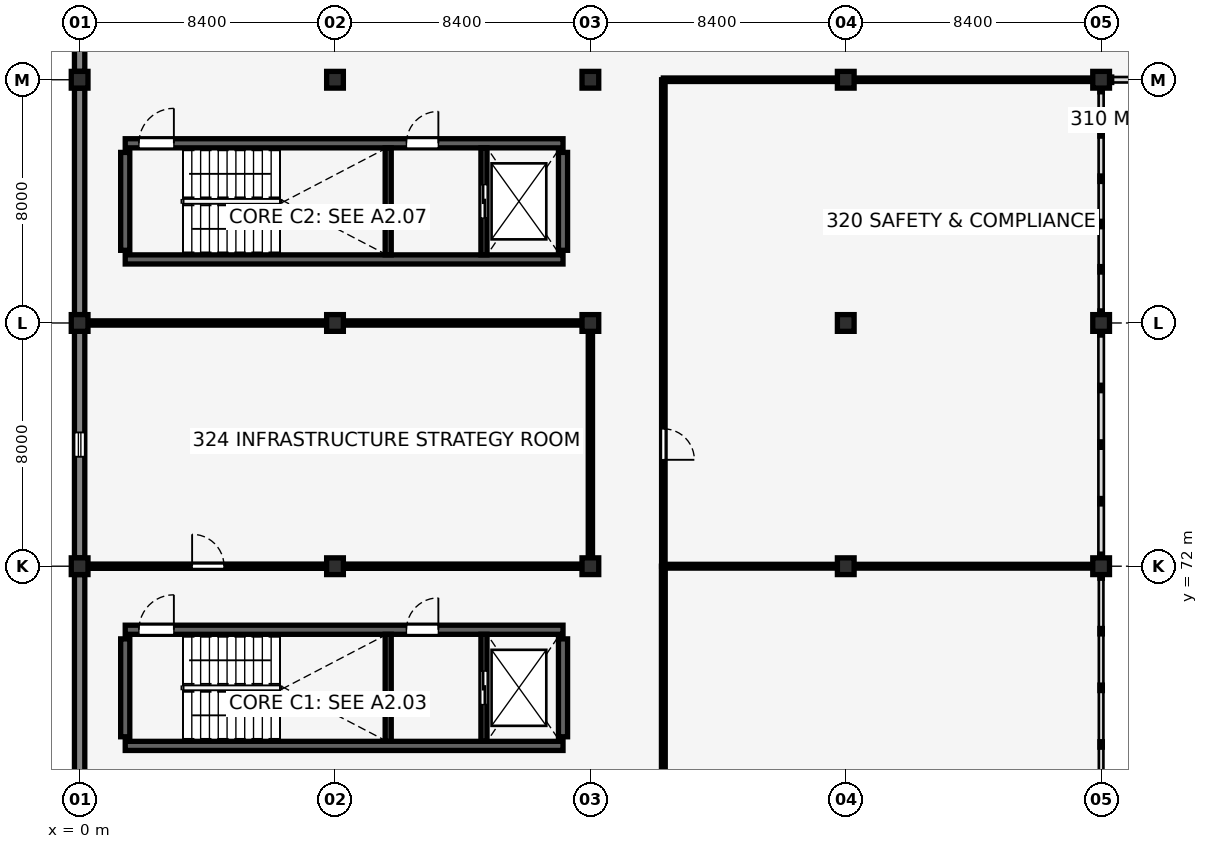
"""IFC4 building model, lengths in metres.
Left out: names, types, materials, properties, quantities, classifications, styles, units other than length and angle.
Written with IfcOpenShell. Run it as: python <this file> out.ifc"""

import sys

from ifc_helpers import new_model, si_unit, direction, frame, frame_2d, origin, origin_2d, place, context, subcontext, project, spatial, rectangle, extrude, element, fill, save


model = new_model("IFC4")
c1 = context("Model", 3, precision=1e-05, world=origin(), true_north=direction((0.0, 1.0)))
c2 = subcontext(c1, "Body", "Model", "MODEL_VIEW")
j1 = project(units=[si_unit("LENGTHUNIT", "METRE"), si_unit("PLANEANGLEUNIT", "RADIAN")], contexts=[c1])
p1 = place(None, origin())
s1 = spatial("IfcSite", under=j1, at=p1, CompositionType="ELEMENT")
p2 = place(p1, origin())
s2 = spatial("IfcBuilding", under=s1, at=p2, CompositionType="ELEMENT")
p3 = place(p2, frame((0.0, 0.0, 13.36)))
s3 = spatial("IfcBuildingStorey", under=s2, at=p3, CompositionType="ELEMENT", Elevation=13.36)
p4 = place(p3, frame((1.5, 66.09, 0.0), z_axis=(0.0, 0.0, 1.0), x_axis=(1.0, 0.0, 0.0)))
e1 = element("IfcWall", 1, at=p4, inside=s3, PredefinedType="SHEAR", context=c2, shape_type="SweptSolid", body=[
    extrude(rectangle(XDim=14.4, YDim=0.3, at=frame_2d((7.2, 0.0))), origin(), (0.0, 0.0, 1.0), 3.58),
])
p5 = place(p3, frame((1.5, 69.91, 0.0), z_axis=(0.0, 0.0, 1.0), x_axis=(1.0, 0.0, 0.0)))
e2 = element("IfcWall", 2, at=p5, inside=s3, PredefinedType="SHEAR", context=c2, shape_type="SweptSolid", body=[
    extrude(rectangle(XDim=14.4, YDim=0.3, at=frame_2d((7.2, 0.0))), origin(), (0.0, 0.0, 1.0), 3.58),
])
p6 = place(p5, frame((0.45, 0.0, 0.0), z_axis=(0.0, 0.0, 1.0), x_axis=(1.0, 0.0, 0.0)))
e3 = element("IfcOpeningElement", 3, at=p6, cuts=e2, PredefinedType="OPENING", context=c2, shape_type="SweptSolid", body=[
    extrude(rectangle(XDim=1.15, YDim=2.15, at=frame_2d((0.575, 1.075))), frame((0.0, 0.16, 0.0), z_axis=(0.0, -1.0, 0.0), x_axis=(1.0, 0.0, 0.0)), (0.0, 0.0, 1.0), 0.32),
])
p7 = place(p5, frame((9.25, 0.0, 0.0), z_axis=(0.0, 0.0, 1.0), x_axis=(1.0, 0.0, 0.0)))
e4 = element("IfcOpeningElement", 4, at=p7, cuts=e2, PredefinedType="OPENING", context=c2, shape_type="SweptSolid", body=[
    extrude(rectangle(XDim=1.05, YDim=2.15, at=frame_2d((0.525, 1.075))), frame((0.0, 0.16, 0.0), z_axis=(0.0, -1.0, 0.0), x_axis=(1.0, 0.0, 0.0)), (0.0, 0.0, 1.0), 0.32),
])
for number, where, z_axis, x_axis in (
    (5, (1.5, 66.39, 0.0), (0.0, 0.0, 1.0), (0.0, 1.0, 0.0)),
    (6, (15.9, 66.39, 0.0), (0.0, 0.0, 1.0), (0.0, 1.0, 0.0)),
):
    element("IfcWall", number, at=place(p3, frame(where, z_axis=z_axis, x_axis=x_axis)), inside=s3, PredefinedType="SHEAR", context=c2, shape_type="SweptSolid", body=[
        extrude(rectangle(XDim=3.22, YDim=0.3, at=frame_2d((1.61, 0.0))), origin(), (0.0, 0.0, 1.0), 3.58),
    ])
p8 = place(p3, frame((1.5, 82.09, 0.0), z_axis=(0.0, 0.0, 1.0), x_axis=(1.0, 0.0, 0.0)))
e7 = element("IfcWall", 7, at=p8, inside=s3, PredefinedType="SHEAR", context=c2, shape_type="SweptSolid", body=[
    extrude(rectangle(XDim=14.4, YDim=0.3, at=frame_2d((7.2, 0.0))), origin(), (0.0, 0.0, 1.0), 3.58),
])
p9 = place(p3, frame((1.5, 85.91, 0.0), z_axis=(0.0, 0.0, 1.0), x_axis=(1.0, 0.0, 0.0)))
e8 = element("IfcWall", 8, at=p9, inside=s3, PredefinedType="SHEAR", context=c2, shape_type="SweptSolid", body=[
    extrude(rectangle(XDim=14.4, YDim=0.3, at=frame_2d((7.2, 0.0))), origin(), (0.0, 0.0, 1.0), 3.58),
])
p10 = place(p9, frame((0.45, 0.0, 0.0), z_axis=(0.0, 0.0, 1.0), x_axis=(1.0, 0.0, 0.0)))
e9 = element("IfcOpeningElement", 9, at=p10, cuts=e8, PredefinedType="OPENING", context=c2, shape_type="SweptSolid", body=[
    extrude(rectangle(XDim=1.15, YDim=2.15, at=frame_2d((0.575, 1.075))), frame((0.0, 0.16, 0.0), z_axis=(0.0, -1.0, 0.0), x_axis=(1.0, 0.0, 0.0)), (0.0, 0.0, 1.0), 0.32),
])
p11 = place(p9, frame((9.25, 0.0, 0.0), z_axis=(0.0, 0.0, 1.0), x_axis=(1.0, 0.0, 0.0)))
e10 = element("IfcOpeningElement", 10, at=p11, cuts=e8, PredefinedType="OPENING", context=c2, shape_type="SweptSolid", body=[
    extrude(rectangle(XDim=1.05, YDim=2.15, at=frame_2d((0.525, 1.075))), frame((0.0, 0.16, 0.0), z_axis=(0.0, -1.0, 0.0), x_axis=(1.0, 0.0, 0.0)), (0.0, 0.0, 1.0), 0.32),
])
for number, where, z_axis, x_axis in (
    (11, (1.5, 82.39, 0.0), (0.0, 0.0, 1.0), (0.0, 1.0, 0.0)),
    (12, (15.9, 82.39, 0.0), (0.0, 0.0, 1.0), (0.0, 1.0, 0.0)),
):
    element("IfcWall", number, at=place(p3, frame(where, z_axis=z_axis, x_axis=x_axis)), inside=s3, PredefinedType="SHEAR", context=c2, shape_type="SweptSolid", body=[
        extrude(rectangle(XDim=3.22, YDim=0.3, at=frame_2d((1.61, 0.0))), origin(), (0.0, 0.0, 1.0), 3.58),
    ])
for number, where, z_axis, x_axis in (
    (13, (0.0, 72.0, 0.0), (0.0, 0.0, 1.0), (1.0, 0.0, 0.0)),
    (14, (0.0, 80.0, 0.0), (0.0, 0.0, 1.0), (1.0, 0.0, 0.0)),
    (15, (0.0, 88.0, 0.0), (0.0, 0.0, 1.0), (1.0, 0.0, 0.0)),
    (16, (8.4, 72.0, 0.0), (0.0, 0.0, 1.0), (1.0, 0.0, 0.0)),
    (17, (8.4, 80.0, 0.0), (0.0, 0.0, 1.0), (1.0, 0.0, 0.0)),
    (18, (8.4, 88.0, 0.0), (0.0, 0.0, 1.0), (1.0, 0.0, 0.0)),
    (19, (16.8, 72.0, 0.0), (0.0, 0.0, 1.0), (1.0, 0.0, 0.0)),
    (20, (16.8, 80.0, 0.0), (0.0, 0.0, 1.0), (1.0, 0.0, 0.0)),
    (21, (16.8, 88.0, 0.0), (0.0, 0.0, 1.0), (1.0, 0.0, 0.0)),
    (22, (25.2, 72.0, 0.0), (0.0, 0.0, 1.0), (1.0, 0.0, 0.0)),
    (23, (25.2, 80.0, 0.0), (0.0, 0.0, 1.0), (1.0, 0.0, 0.0)),
    (24, (25.2, 88.0, 0.0), (0.0, 0.0, 1.0), (1.0, 0.0, 0.0)),
    (25, (33.6, 72.0, 0.0), (0.0, 0.0, 1.0), (1.0, 0.0, 0.0)),
    (26, (33.6, 80.0, 0.0), (0.0, 0.0, 1.0), (1.0, 0.0, 0.0)),
    (27, (33.6, 88.0, 0.0), (0.0, 0.0, 1.0), (1.0, 0.0, 0.0)),
):
    element("IfcColumn", number, at=place(p3, frame(where, z_axis=z_axis, x_axis=x_axis)), inside=s3, PredefinedType="COLUMN", context=c2, shape_type="SweptSolid", body=[
        extrude(rectangle(XDim=0.55, YDim=0.55, at=origin_2d()), origin(), (0.0, 0.0, 1.0), 3.58),
    ])
p12 = place(p3, frame((0.0, 64.275, 0.0), z_axis=(0.0, 0.0, 1.0), x_axis=(0.0, 1.0, 0.0)))
e28 = element("IfcWall", 28, at=p12, inside=s3, PredefinedType="SOLIDWALL", context=c2, shape_type="SweptSolid", body=[
    extrude(rectangle(XDim=7.45, YDim=0.34, at=frame_2d((3.725, 0.0))), origin(), (0.0, 0.0, 1.0), 3.28),
])
p13 = place(p3, frame((0.0, 72.275, 0.0), z_axis=(0.0, 0.0, 1.0), x_axis=(0.0, 1.0, 0.0)))
e29 = element("IfcWall", 29, at=p13, inside=s3, PredefinedType="SOLIDWALL", context=c2, shape_type="SweptSolid", body=[
    extrude(rectangle(XDim=7.45, YDim=0.34, at=frame_2d((3.725, 0.0))), origin(), (0.0, 0.0, 1.0), 3.28),
])
p14 = place(p13, frame((3.325, 0.0, 0.65), z_axis=(0.0, 0.0, 1.0), x_axis=(1.0, 0.0, 0.0)))
e30 = element("IfcOpeningElement", 30, at=p14, cuts=e29, PredefinedType="OPENING", context=c2, shape_type="SweptSolid", body=[
    extrude(rectangle(XDim=0.8, YDim=1.85, at=frame_2d((0.4, 0.925))), frame((0.0, 0.18, 0.0), z_axis=(0.0, -1.0, 0.0), x_axis=(1.0, 0.0, 0.0)), (0.0, 0.0, 1.0), 0.36),
])
p15 = place(p3, frame((0.0, 80.275, 0.0), z_axis=(0.0, 0.0, 1.0), x_axis=(0.0, 1.0, 0.0)))
e31 = element("IfcWall", 31, at=p15, inside=s3, PredefinedType="SOLIDWALL", context=c2, shape_type="SweptSolid", body=[
    extrude(rectangle(XDim=7.45, YDim=0.34, at=frame_2d((3.725, 0.0))), origin(), (0.0, 0.0, 1.0), 3.28),
])
p16 = place(p3, frame((0.0, 88.275, 0.0), z_axis=(0.0, 0.0, 1.0), x_axis=(0.0, 1.0, 0.0)))
e32 = element("IfcWall", 32, at=p16, inside=s3, PredefinedType="SOLIDWALL", context=c2, shape_type="SweptSolid", body=[
    extrude(rectangle(XDim=7.45, YDim=0.34, at=frame_2d((3.725, 0.0))), origin(), (0.0, 0.0, 1.0), 3.28),
])
p17 = place(p16, frame((3.125, 0.0, 1.55), z_axis=(0.0, 0.0, 1.0), x_axis=(1.0, 0.0, 0.0)))
e33 = element("IfcOpeningElement", 33, at=p17, cuts=e32, PredefinedType="OPENING", context=c2, shape_type="SweptSolid", body=[
    extrude(rectangle(XDim=1.2, YDim=0.95, at=frame_2d((0.6, 0.475))), frame((0.0, 0.18, 0.0), z_axis=(0.0, -1.0, 0.0), x_axis=(1.0, 0.0, 0.0)), (0.0, 0.0, 1.0), 0.36),
])
p18 = place(p3, frame((10.15, 66.24, 0.0), z_axis=(0.0, 0.0, 1.0), x_axis=(0.0, 1.0, 0.0)))
e34 = element("IfcWall", 34, at=p18, inside=s3, PredefinedType="SHEAR", context=c2, shape_type="SweptSolid", body=[
    extrude(rectangle(XDim=3.52, YDim=0.2, at=frame_2d((1.76, 0.0))), origin(), (0.0, 0.0, 1.0), 3.58),
])
p19 = place(p3, frame((13.3, 66.24, 0.0), z_axis=(0.0, 0.0, 1.0), x_axis=(0.0, 1.0, 0.0)))
e35 = element("IfcWall", 35, at=p19, inside=s3, PredefinedType="SHEAR", context=c2, shape_type="SweptSolid", body=[
    extrude(rectangle(XDim=3.52, YDim=0.2, at=frame_2d((1.76, 0.0))), origin(), (0.0, 0.0, 1.0), 3.58),
])
p20 = place(p19, frame((1.21, 0.0, 0.0), z_axis=(0.0, 0.0, 1.0), x_axis=(1.0, 0.0, 0.0)))
e36 = element("IfcOpeningElement", 36, at=p20, cuts=e35, PredefinedType="OPENING", context=c2, shape_type="SweptSolid", body=[
    extrude(rectangle(XDim=1.1, YDim=2.15, at=frame_2d((0.55, 1.075))), frame((0.0, 0.11, 0.0), z_axis=(0.0, -1.0, 0.0), x_axis=(1.0, 0.0, 0.0)), (0.0, 0.0, 1.0), 0.22),
])
p21 = place(p3, frame((10.15, 82.24, 0.0), z_axis=(0.0, 0.0, 1.0), x_axis=(0.0, 1.0, 0.0)))
e37 = element("IfcWall", 37, at=p21, inside=s3, PredefinedType="SHEAR", context=c2, shape_type="SweptSolid", body=[
    extrude(rectangle(XDim=3.52, YDim=0.2, at=frame_2d((1.76, 0.0))), origin(), (0.0, 0.0, 1.0), 3.58),
])
p22 = place(p3, frame((13.3, 82.24, 0.0), z_axis=(0.0, 0.0, 1.0), x_axis=(0.0, 1.0, 0.0)))
e38 = element("IfcWall", 38, at=p22, inside=s3, PredefinedType="SHEAR", context=c2, shape_type="SweptSolid", body=[
    extrude(rectangle(XDim=3.52, YDim=0.2, at=frame_2d((1.76, 0.0))), origin(), (0.0, 0.0, 1.0), 3.58),
])
p23 = place(p22, frame((1.21, 0.0, 0.0), z_axis=(0.0, 0.0, 1.0), x_axis=(1.0, 0.0, 0.0)))
e39 = element("IfcOpeningElement", 39, at=p23, cuts=e38, PredefinedType="OPENING", context=c2, shape_type="SweptSolid", body=[
    extrude(rectangle(XDim=1.1, YDim=2.15, at=frame_2d((0.55, 1.075))), frame((0.0, 0.11, 0.0), z_axis=(0.0, -1.0, 0.0), x_axis=(1.0, 0.0, 0.0)), (0.0, 0.0, 1.0), 0.22),
])
p24 = place(p3, frame((0.265, 72.0, 0.0), z_axis=(0.0, 0.0, 1.0), x_axis=(1.0, 0.0, 0.0)))
e40 = element("IfcWall", 40, at=p24, inside=s3, PredefinedType="PARTITIONING", context=c2, shape_type="SweptSolid", body=[
    extrude(rectangle(XDim=7.87, YDim=0.14, at=frame_2d((3.935, 0.0))), origin(), (0.0, 0.0, 1.0), 3.123),
])
p25 = place(p24, frame((3.435, 0.0, 0.0), z_axis=(0.0, 0.0, 1.0), x_axis=(1.0, 0.0, 0.0)))
e41 = element("IfcOpeningElement", 41, at=p25, cuts=e40, PredefinedType="OPENING", context=c2, shape_type="SweptSolid", body=[
    extrude(rectangle(XDim=1.05, YDim=2.15, at=frame_2d((0.525, 1.075))), frame((0.0, 0.08, 0.0), z_axis=(0.0, -1.0, 0.0), x_axis=(1.0, 0.0, 0.0)), (0.0, 0.0, 1.0), 0.16),
])
p26 = place(p3, frame((19.2, 48.04, 0.0), z_axis=(0.0, 0.0, 1.0), x_axis=(0.0, 1.0, 0.0)))
e42 = element("IfcWall", 42, at=p26, inside=s3, PredefinedType="PARTITIONING", context=c2, shape_type="SweptSolid", body=[
    extrude(rectangle(XDim=23.96, YDim=0.125, at=frame_2d((11.98, 0.0))), origin(), (0.0, 0.0, 1.0), 3.58),
])
p27 = place(p26, frame((4.36, 0.0, 0.0), z_axis=(0.0, 0.0, 1.0), x_axis=(-1.0, 0.0, 0.0)))
e43 = element("IfcOpeningElement", 43, at=p27, cuts=e42, PredefinedType="OPENING", context=c2, shape_type="SweptSolid", body=[
    extrude(rectangle(XDim=0.9, YDim=2.1, at=frame_2d((0.45, 1.05))), frame((0.0, 0.073, 0.0), z_axis=(0.0, -1.0, 0.0), x_axis=(1.0, 0.0, 0.0)), (0.0, 0.0, 1.0), 0.145),
])
p28 = place(p3, frame((19.2, 72.0, 0.0), z_axis=(0.0, 0.0, 1.0), x_axis=(0.0, 1.0, 0.0)))
e44 = element("IfcWall", 44, at=p28, inside=s3, PredefinedType="PARTITIONING", context=c2, shape_type="SweptSolid", body=[
    extrude(rectangle(XDim=16.0, YDim=0.115, at=frame_2d((8.0, 0.0))), origin(), (0.0, 0.0, 1.0), 3.58),
])
p29 = place(p28, frame((4.52, 0.0, 0.0), z_axis=(0.0, 0.0, 1.0), x_axis=(-1.0, 0.0, 0.0)))
e45 = element("IfcOpeningElement", 45, at=p29, cuts=e44, PredefinedType="OPENING", context=c2, shape_type="SweptSolid", body=[
    extrude(rectangle(XDim=1.02, YDim=2.16, at=frame_2d((0.51, 1.08))), frame((0.0, 0.067, 0.0), z_axis=(0.0, -1.0, 0.0), x_axis=(1.0, 0.0, 0.0)), (0.0, 0.0, 1.0), 0.135),
])
p30 = place(p3, frame((8.665, 72.0, 0.0), z_axis=(0.0, 0.0, 1.0), x_axis=(1.0, 0.0, 0.0)))
e46 = element("IfcWall", 46, at=p30, inside=s3, PredefinedType="PARTITIONING", context=c2, shape_type="SweptSolid", body=[
    extrude(rectangle(XDim=7.87, YDim=0.14, at=frame_2d((3.935, 0.0))), origin(), (0.0, 0.0, 1.0), 3.123),
])
p31 = place(p3, frame((0.265, 80.0, 0.0), z_axis=(0.0, 0.0, 1.0), x_axis=(1.0, 0.0, 0.0)))
e47 = element("IfcWall", 47, at=p31, inside=s3, PredefinedType="PARTITIONING", context=c2, shape_type="SweptSolid", body=[
    extrude(rectangle(XDim=7.87, YDim=0.14, at=frame_2d((3.935, 0.0))), origin(), (0.0, 0.0, 1.0), 3.123),
])
p32 = place(p3, frame((8.665, 80.0, 0.0), z_axis=(0.0, 0.0, 1.0), x_axis=(1.0, 0.0, 0.0)))
e48 = element("IfcWall", 48, at=p32, inside=s3, PredefinedType="PARTITIONING", context=c2, shape_type="SweptSolid", body=[
    extrude(rectangle(XDim=7.87, YDim=0.14, at=frame_2d((3.935, 0.0))), origin(), (0.0, 0.0, 1.0), 3.123),
])
p33 = place(p3, frame((16.8, 72.265, 0.0), z_axis=(0.0, 0.0, 1.0), x_axis=(0.0, 1.0, 0.0)))
e49 = element("IfcWall", 49, at=p33, inside=s3, PredefinedType="PARTITIONING", context=c2, shape_type="SweptSolid", body=[
    extrude(rectangle(XDim=7.47, YDim=0.14, at=frame_2d((3.735, 0.0))), origin(), (0.0, 0.0, 1.0), 3.126),
])
p34 = place(p3, frame((19.2, 72.0, 0.0), z_axis=(0.0, 0.0, 1.0), x_axis=(1.0, 0.0, 0.0)))
e50 = element("IfcWall", 50, at=p34, inside=s3, PredefinedType="PARTITIONING", context=c2, shape_type="SweptSolid", body=[
    extrude(rectangle(XDim=5.735, YDim=0.125, at=frame_2d((2.868, 0.0))), origin(), (0.0, 0.0, 1.0), 3.123),
])
p35 = place(p3, frame((25.465, 72.0, 0.0), z_axis=(0.0, 0.0, 1.0), x_axis=(1.0, 0.0, 0.0)))
e51 = element("IfcWall", 51, at=p35, inside=s3, PredefinedType="PARTITIONING", context=c2, shape_type="SweptSolid", body=[
    extrude(rectangle(XDim=7.87, YDim=0.125, at=frame_2d((3.935, 0.0))), origin(), (0.0, 0.0, 1.0), 3.123),
])
p36 = place(p3, frame((19.2, 88.0, 0.0), z_axis=(0.0, 0.0, 1.0), x_axis=(1.0, 0.0, 0.0)))
e52 = element("IfcWall", 52, at=p36, inside=s3, PredefinedType="PARTITIONING", context=c2, shape_type="SweptSolid", body=[
    extrude(rectangle(XDim=5.735, YDim=0.115, at=frame_2d((2.868, 0.0))), origin(), (0.0, 0.0, 1.0), 3.123),
])
p37 = place(p3, frame((25.465, 88.0, 0.0), z_axis=(0.0, 0.0, 1.0), x_axis=(1.0, 0.0, 0.0)))
e53 = element("IfcWall", 53, at=p37, inside=s3, PredefinedType="PARTITIONING", context=c2, shape_type="SweptSolid", body=[
    extrude(rectangle(XDim=7.87, YDim=0.115, at=frame_2d((3.935, 0.0))), origin(), (0.0, 0.0, 1.0), 3.123),
])
p38 = place(p14, origin())
e54 = element("IfcWindow", 54, at=p38, inside=s3, PartitioningType="SINGLE_PANEL", PredefinedType="WINDOW", context=c2, shape_type="SweptSolid", body=[
    extrude(rectangle(XDim=0.8, YDim=1.85, at=frame_2d((0.4, 0.925))), frame((0.0, 0.03, 0.0), z_axis=(0.0, -1.0, 0.0), x_axis=(1.0, 0.0, 0.0)), (0.0, 0.0, 1.0), 0.06),
])
fill(e30, e54)
p39 = place(p6, origin())
e55 = element("IfcDoor", 55, at=p39, inside=s3, OperationType="SINGLE_SWING_RIGHT", PredefinedType="DOOR", context=c2, shape_type="SweptSolid", body=[
    extrude(rectangle(XDim=1.15, YDim=2.15, at=frame_2d((0.575, 1.075))), frame((0.0, 0.025, 0.0), z_axis=(0.0, -1.0, 0.0), x_axis=(1.0, 0.0, 0.0)), (0.0, 0.0, 1.0), 0.05),
])
fill(e3, e55)
p40 = place(p7, origin())
e56 = element("IfcDoor", 56, at=p40, inside=s3, OperationType="SINGLE_SWING_RIGHT", PredefinedType="DOOR", context=c2, shape_type="SweptSolid", body=[
    extrude(rectangle(XDim=1.05, YDim=2.15, at=frame_2d((0.525, 1.075))), frame((0.0, 0.025, 0.0), z_axis=(0.0, -1.0, 0.0), x_axis=(1.0, 0.0, 0.0)), (0.0, 0.0, 1.0), 0.05),
])
fill(e4, e56)
p41 = place(p20, origin())
e57 = element("IfcDoor", 57, at=p41, inside=s3, OperationType="DOUBLE_DOOR_SLIDING", PredefinedType="DOOR", context=c2, shape_type="SweptSolid", body=[
    extrude(rectangle(XDim=1.1, YDim=2.15, at=frame_2d((0.55, 1.075))), frame((0.0, 0.025, 0.0), z_axis=(0.0, -1.0, 0.0), x_axis=(1.0, 0.0, 0.0)), (0.0, 0.0, 1.0), 0.05),
])
fill(e36, e57)
p42 = place(p10, origin())
e58 = element("IfcDoor", 58, at=p42, inside=s3, OperationType="SINGLE_SWING_RIGHT", PredefinedType="DOOR", context=c2, shape_type="SweptSolid", body=[
    extrude(rectangle(XDim=1.15, YDim=2.15, at=frame_2d((0.575, 1.075))), frame((0.0, 0.025, 0.0), z_axis=(0.0, -1.0, 0.0), x_axis=(1.0, 0.0, 0.0)), (0.0, 0.0, 1.0), 0.05),
])
fill(e9, e58)
p43 = place(p11, origin())
e59 = element("IfcDoor", 59, at=p43, inside=s3, OperationType="SINGLE_SWING_RIGHT", PredefinedType="DOOR", context=c2, shape_type="SweptSolid", body=[
    extrude(rectangle(XDim=1.05, YDim=2.15, at=frame_2d((0.525, 1.075))), frame((0.0, 0.025, 0.0), z_axis=(0.0, -1.0, 0.0), x_axis=(1.0, 0.0, 0.0)), (0.0, 0.0, 1.0), 0.05),
])
fill(e10, e59)
p44 = place(p23, origin())
e60 = element("IfcDoor", 60, at=p44, inside=s3, OperationType="DOUBLE_DOOR_SLIDING", PredefinedType="DOOR", context=c2, shape_type="SweptSolid", body=[
    extrude(rectangle(XDim=1.1, YDim=2.15, at=frame_2d((0.55, 1.075))), frame((0.0, 0.025, 0.0), z_axis=(0.0, -1.0, 0.0), x_axis=(1.0, 0.0, 0.0)), (0.0, 0.0, 1.0), 0.05),
])
fill(e39, e60)
p45 = place(p25, origin())
e61 = element("IfcDoor", 61, at=p45, inside=s3, OperationType="SINGLE_SWING_LEFT", PredefinedType="DOOR", context=c2, shape_type="SweptSolid", body=[
    extrude(rectangle(XDim=1.05, YDim=2.15, at=frame_2d((0.525, 1.075))), frame((0.0, 0.025, 0.0), z_axis=(0.0, -1.0, 0.0), x_axis=(1.0, 0.0, 0.0)), (0.0, 0.0, 1.0), 0.05),
])
fill(e41, e61)
p46 = place(p29, origin())
e62 = element("IfcDoor", 62, at=p46, inside=s3, OperationType="SINGLE_SWING_RIGHT", PredefinedType="DOOR", context=c2, shape_type="SweptSolid", body=[
    extrude(rectangle(XDim=1.02, YDim=2.16, at=frame_2d((0.51, 1.08))), frame((0.0, 0.025, 0.0), z_axis=(0.0, -1.0, 0.0), x_axis=(1.0, 0.0, 0.0)), (0.0, 0.0, 1.0), 0.05),
])
fill(e45, e62)
save(model, sys.argv[1])
